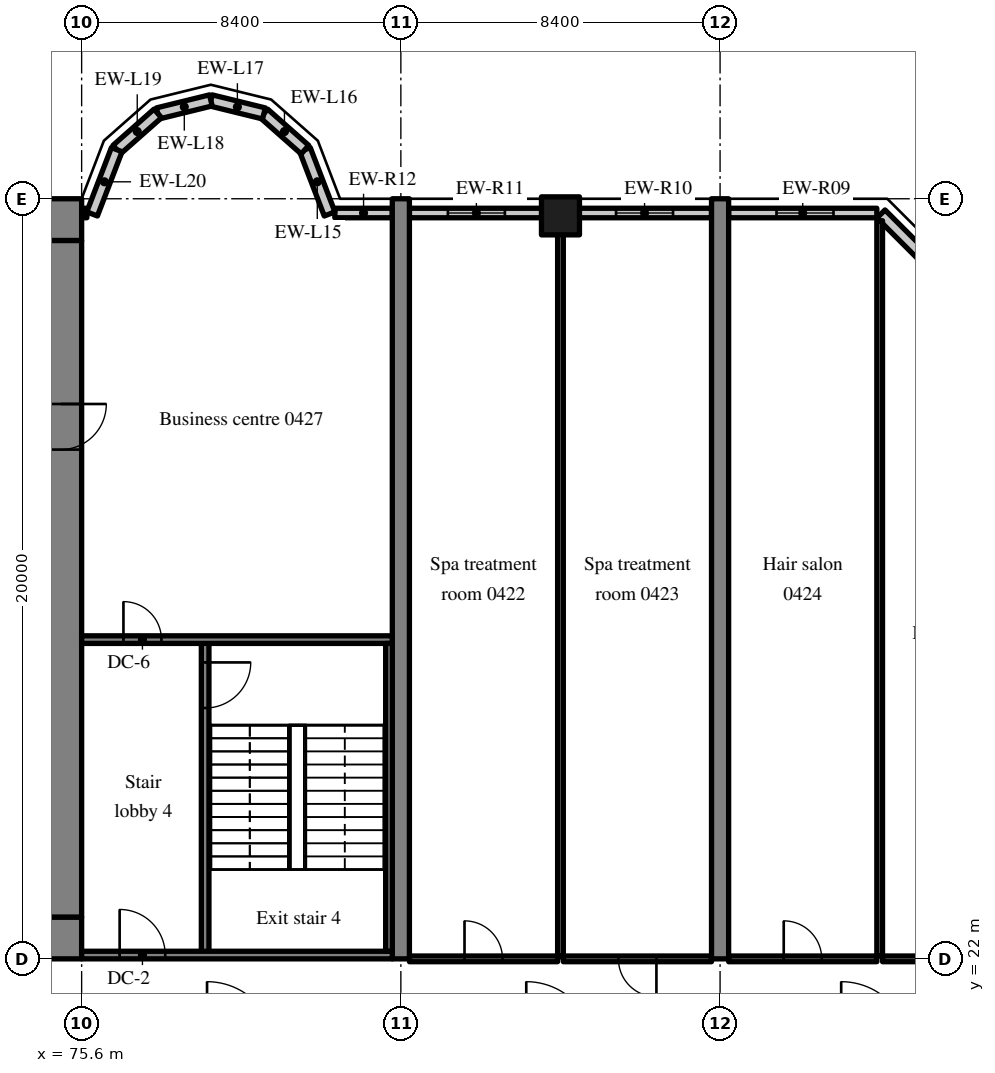
"""IFC4 building model, lengths in metres.
Left out: names, types, materials, properties, quantities, classifications, styles, units other than length and angle.
Written with IfcOpenShell. Run it as: python <this file> out.ifc"""

import sys

from ifc_helpers import new_model, si_unit, direction, frame, frame_2d, origin, origin_2d, place, context, subcontext, project, spatial, rectangle, extrude, source, transform, mapped, element, fill, save


model = new_model("IFC4")
c1 = context("Model", 3, precision=1e-05, world=origin(), true_north=direction((0.0, 1.0)))
c2 = subcontext(c1, "Body", "Model", "MODEL_VIEW")
j1 = project(units=[si_unit("LENGTHUNIT", "METRE"), si_unit("PLANEANGLEUNIT", "RADIAN")], contexts=[c1])
p1 = place(None, origin())
s1 = spatial("IfcSite", under=j1, at=p1, CompositionType="ELEMENT")
p2 = place(p1, origin())
s2 = spatial("IfcBuilding", under=s1, at=p2, CompositionType="ELEMENT")
p3 = place(p2, frame((0.0, 0.0, 23.0)))
s3 = spatial("IfcBuildingStorey", under=s2, at=p3, CompositionType="ELEMENT", Elevation=23.0)
m1 = source(origin(), c2, "Body", "SweptSolid", [
    extrude(rectangle(XDim=50.4, YDim=1.1, at=frame_2d((25.2, 0.0))), origin(), (0.0, 0.0, 1.0), 4.52),
])
p4 = place(p3, frame((25.2, 22.55, 0.0), z_axis=(0.0, 0.0, 1.0), x_axis=(1.0, 0.0, 0.0)))
e1 = element("IfcWall", 1, at=p4, inside=s3, PredefinedType="SHEAR", context=c2, shape_type="MappedRepresentation", body=[
    mapped(m1, transform((0.0, 0.0, 0.0), scale=1.0)),
])
m2 = source(origin(), c2, "Body", "SweptSolid", [
    extrude(rectangle(XDim=1.8, YDim=2.1, at=frame_2d((0.9, 1.05))), frame((0.0, 0.56, 0.0), z_axis=(0.0, -1.0, 0.0), x_axis=(1.0, 0.0, 0.0)), (0.0, 0.0, 1.0), 1.12),
])
p5 = place(p4, frame((15.9, 0.0, 0.0)))
e2 = element("IfcOpeningElement", 2, at=p5, cuts=e1, PredefinedType="OPENING", context=c2, shape_type="MappedRepresentation", body=[
    mapped(m2, transform((0.0, 0.0, 0.0), scale=1.0)),
])
m3 = source(origin(), c2, "Body", "SweptSolid", [
    extrude(rectangle(XDim=1.2, YDim=2.1, at=frame_2d((0.6, 1.05))), frame((0.0, 0.56, 0.0), z_axis=(0.0, -1.0, 0.0), x_axis=(1.0, 0.0, 0.0)), (0.0, 0.0, 1.0), 1.12),
])
p6 = place(p4, frame((27.0, 0.0, 0.0)))
e3 = element("IfcOpeningElement", 3, at=p6, cuts=e1, PredefinedType="OPENING", context=c2, shape_type="MappedRepresentation", body=[
    mapped(m3, transform((0.0, 0.0, 0.0), scale=1.0)),
])
m4 = source(origin(), c2, "Body", "SweptSolid", [
    extrude(rectangle(XDim=0.9, YDim=2.1, at=frame_2d((0.45, 1.05))), frame((0.0, 0.56, 0.0), z_axis=(0.0, -1.0, 0.0), x_axis=(1.0, 0.0, 0.0)), (0.0, 0.0, 1.0), 1.12),
])
p7 = place(p4, frame((32.25, 0.0, 0.0)))
e4 = element("IfcOpeningElement", 4, at=p7, cuts=e1, PredefinedType="OPENING", context=c2, shape_type="MappedRepresentation", body=[
    mapped(m4, transform((0.0, 0.0, 0.0), scale=1.0)),
])
p8 = place(p4, frame((38.25, 0.0, 0.0)))
e5 = element("IfcOpeningElement", 5, at=p8, cuts=e1, PredefinedType="OPENING", context=c2, shape_type="MappedRepresentation", body=[
    mapped(m4, transform((0.0, 0.0, 0.0), scale=1.0)),
])
p9 = place(p4, frame((6.425, 0.0, 0.0)))
e6 = element("IfcOpeningElement", 6, at=p9, cuts=e1, PredefinedType="OPENING", context=c2, shape_type="MappedRepresentation", body=[
    mapped(m3, transform((0.0, 0.0, 0.0), scale=1.0)),
])
p10 = place(p4, frame((47.675, 0.0, 0.0)))
e7 = element("IfcOpeningElement", 7, at=p10, cuts=e1, PredefinedType="OPENING", context=c2, shape_type="MappedRepresentation", body=[
    mapped(m3, transform((0.0, 0.0, 0.0), scale=1.0)),
])
p11 = place(p3, frame((25.2, 41.45, 0.0), z_axis=(0.0, 0.0, 1.0), x_axis=(1.0, 0.0, 0.0)))
e8 = element("IfcWall", 8, at=p11, inside=s3, PredefinedType="SHEAR", context=c2, shape_type="MappedRepresentation", body=[
    mapped(m1, transform((0.0, 0.0, 0.0), scale=1.0)),
])
m5 = source(origin(), c2, "Body", "SweptSolid", [
    extrude(rectangle(XDim=17.8, YDim=1.1, at=frame_2d((8.9, 0.0))), origin(), (0.0, 0.0, 1.0), 4.52),
])
p12 = place(p3, frame((75.05, 23.1, 0.0), z_axis=(0.0, 0.0, 1.0), x_axis=(0.0, 1.0, 0.0)))
e9 = element("IfcWall", 9, at=p12, inside=s3, PredefinedType="SHEAR", context=c2, shape_type="MappedRepresentation", body=[
    mapped(m5, transform((0.0, 0.0, 0.0), scale=1.0)),
])
p13 = place(p12, frame((12.3, 0.0, 0.0)))
e10 = element("IfcOpeningElement", 10, at=p13, cuts=e9, PredefinedType="OPENING", context=c2, shape_type="MappedRepresentation", body=[
    mapped(m3, transform((0.0, 0.0, 0.0), scale=1.0)),
])
m6 = source(origin(), c2, "Body", "SweptSolid", [
    extrude(rectangle(XDim=20.0, YDim=0.45, at=frame_2d((10.0, 0.0))), origin(), (0.0, 0.0, 1.0), 4.52),
])
for number, where, z_axis, x_axis in (
    (11, (84.0, 22.0, 0.0), (0.0, 0.0, 1.0), (0.0, 1.0, 0.0)),
    (12, (92.4, 22.0, 0.0), (0.0, 0.0, 1.0), (0.0, 1.0, 0.0)),
):
    element("IfcWall", number, at=place(p3, frame(where, z_axis=z_axis, x_axis=x_axis)), inside=s3, PredefinedType="SHEAR", context=c2, shape_type="MappedRepresentation", body=[
        mapped(m6, transform((0.0, 0.0, 0.0), scale=1.0)),
    ])
m7 = source(origin(), c2, "Body", "SweptSolid", [
    extrude(rectangle(XDim=1.0, YDim=1.0, at=origin_2d()), origin(), (0.0, 0.0, 1.0), 4.52),
])
p14 = place(p3, frame((88.2, 41.55, 0.0), z_axis=(0.0, 0.0, 1.0), x_axis=(1.0, 0.0, 0.0)))
e13 = element("IfcColumn", 13, at=p14, inside=s3, PredefinedType="COLUMN", context=c2, shape_type="MappedRepresentation", body=[
    mapped(m7, transform((0.0, 0.0, 0.0), scale=1.0)),
])
m8 = source(origin(), c2, "Body", "SweptSolid", [
    extrude(rectangle(XDim=5.173, YDim=0.3, at=frame_2d((2.586, 0.0))), origin(), (0.0, 0.0, 1.0), 3.77),
])
p15 = place(p3, frame((100.292, 37.942, 0.0), z_axis=(0.0, 0.0, 1.0), x_axis=(-0.707106781187, 0.707106781187, 0.0)))
e14 = element("IfcWall", 14, at=p15, inside=s3, PredefinedType="SOLIDWALL", context=c2, shape_type="MappedRepresentation", body=[
    mapped(m8, transform((0.0, 0.0, 0.0), scale=1.0)),
])
m9 = source(origin(), c2, "Body", "SweptSolid", [
    extrude(rectangle(XDim=1.5, YDim=1.5, at=frame_2d((0.75, 0.75))), frame((0.0, 0.16, 0.0), z_axis=(0.0, -1.0, 0.0), x_axis=(1.0, 0.0, 0.0)), (0.0, 0.0, 1.0), 0.32),
])
p16 = place(p15, frame((1.836, 0.0, 0.9)))
e15 = element("IfcOpeningElement", 15, at=p16, cuts=e14, PredefinedType="OPENING", context=c2, shape_type="MappedRepresentation", body=[
    mapped(m9, transform((0.0, 0.0, 0.0), scale=1.0)),
])
m10 = source(origin(), c2, "Body", "SweptSolid", [
    extrude(rectangle(XDim=3.9, YDim=0.25, at=frame_2d((1.95, 0.0))), origin(), (0.0, 0.0, 1.0), 3.77),
])
p17 = place(p3, frame((96.525, 41.625, 0.0), z_axis=(0.0, 0.0, 1.0), x_axis=(-1.0, 0.0, 0.0)))
e16 = element("IfcWall", 16, at=p17, inside=s3, PredefinedType="SOLIDWALL", context=c2, shape_type="MappedRepresentation", body=[
    mapped(m10, transform((0.0, 0.0, 0.0), scale=1.0)),
])
m11 = source(origin(), c2, "Body", "SweptSolid", [
    extrude(rectangle(XDim=1.5, YDim=1.5, at=frame_2d((0.75, 0.75))), frame((0.0, 0.135, 0.0), z_axis=(0.0, -1.0, 0.0), x_axis=(1.0, 0.0, 0.0)), (0.0, 0.0, 1.0), 0.27),
])
p18 = place(p17, frame((1.14, 0.0, 0.9)))
e17 = element("IfcOpeningElement", 17, at=p18, cuts=e16, PredefinedType="OPENING", context=c2, shape_type="MappedRepresentation", body=[
    mapped(m11, transform((0.0, 0.0, 0.0), scale=1.0)),
])
m12 = source(origin(), c2, "Body", "SweptSolid", [
    extrude(rectangle(XDim=3.525, YDim=0.25, at=frame_2d((1.763, 0.0))), origin(), (0.0, 0.0, 1.0), 3.77),
])
p19 = place(p3, frame((92.175, 41.625, 0.0), z_axis=(0.0, 0.0, 1.0), x_axis=(-1.0, 0.0, 0.0)))
e18 = element("IfcWall", 18, at=p19, inside=s3, PredefinedType="SOLIDWALL", context=c2, shape_type="MappedRepresentation", body=[
    mapped(m12, transform((0.0, 0.0, 0.0), scale=1.0)),
])
p20 = place(p19, frame((1.012, 0.0, 0.9)))
e19 = element("IfcOpeningElement", 19, at=p20, cuts=e18, PredefinedType="OPENING", context=c2, shape_type="MappedRepresentation", body=[
    mapped(m11, transform((0.0, 0.0, 0.0), scale=1.0)),
])
m13 = source(origin(), c2, "Body", "SweptSolid", [
    extrude(rectangle(XDim=3.525, YDim=0.25, at=frame_2d((1.762, 0.0))), origin(), (0.0, 0.0, 1.0), 3.77),
])
p21 = place(p3, frame((87.75, 41.625, 0.0), z_axis=(0.0, 0.0, 1.0), x_axis=(-1.0, 0.0, 0.0)))
e20 = element("IfcWall", 20, at=p21, inside=s3, PredefinedType="SOLIDWALL", context=c2, shape_type="MappedRepresentation", body=[
    mapped(m13, transform((0.0, 0.0, 0.0), scale=1.0)),
])
p22 = place(p21, frame((1.012, 0.0, 0.9)))
e21 = element("IfcOpeningElement", 21, at=p22, cuts=e20, PredefinedType="OPENING", context=c2, shape_type="MappedRepresentation", body=[
    mapped(m11, transform((0.0, 0.0, 0.0), scale=1.0)),
])
m14 = source(origin(), c2, "Body", "SweptSolid", [
    extrude(rectangle(XDim=1.513, YDim=0.25, at=frame_2d((0.756, 0.0))), origin(), (0.0, 0.0, 1.0), 3.77),
])
p23 = place(p3, frame((83.775, 41.625, 0.0), z_axis=(0.0, 0.0, 1.0), x_axis=(-1.0, 0.0, 0.0)))
e22 = element("IfcWall", 22, at=p23, inside=s3, PredefinedType="SOLIDWALL", context=c2, shape_type="MappedRepresentation", body=[
    mapped(m14, transform((0.0, 0.0, 0.0), scale=1.0)),
])
m15 = source(origin(), c2, "Body", "SweptSolid", [
    extrude(rectangle(XDim=1.812, YDim=0.3, at=frame_2d((0.906, 0.0))), origin(), (0.0, 0.0, 1.0), 4.52),
])
p24 = place(p3, frame((82.125, 41.6, 0.0), z_axis=(0.0, 0.0, 1.0), x_axis=(-0.357877270961, 0.93376863244, 0.0)))
e23 = element("IfcWall", 23, at=p24, inside=s3, PredefinedType="SOLIDWALL", context=c2, shape_type="MappedRepresentation", body=[
    mapped(m15, transform((0.0, 0.0, 0.0), scale=1.0)),
])
m16 = source(origin(), c2, "Body", "SweptSolid", [
    extrude(rectangle(XDim=1.44, YDim=0.3, at=frame_2d((0.72, 0.0))), origin(), (0.0, 0.0, 1.0), 4.52),
])
p25 = place(p3, frame((81.477, 43.292, 0.0), z_axis=(0.0, 0.0, 1.0), x_axis=(-0.74957555648, 0.661918790432, 0.0)))
e24 = element("IfcWall", 24, at=p25, inside=s3, PredefinedType="SOLIDWALL", context=c2, shape_type="MappedRepresentation", body=[
    mapped(m16, transform((0.0, 0.0, 0.0), scale=1.0)),
])
m17 = source(origin(), c2, "Body", "SweptSolid", [
    extrude(rectangle(XDim=1.439, YDim=0.3, at=frame_2d((0.719, 0.0))), origin(), (0.0, 0.0, 1.0), 4.52),
])
for number, where, z_axis, x_axis in (
    (25, (80.397, 44.245, 0.0), (0.0, 0.0, 1.0), (-0.971, 0.238, 0.0)),
    (26, (79.0, 44.588, 0.0), (0.0, 0.0, 1.0), (-0.971, -0.238, 0.0)),
):
    element("IfcWall", number, at=place(p3, frame(where, z_axis=z_axis, x_axis=x_axis)), inside=s3, PredefinedType="SOLIDWALL", context=c2, shape_type="MappedRepresentation", body=[
        mapped(m17, transform((0.0, 0.0, 0.0), scale=1.0)),
    ])
p26 = place(p3, frame((77.603, 44.245, 0.0), z_axis=(0.0, 0.0, 1.0), x_axis=(-0.74957555648, -0.661918790432, 0.0)))
e27 = element("IfcWall", 27, at=p26, inside=s3, PredefinedType="SOLIDWALL", context=c2, shape_type="MappedRepresentation", body=[
    mapped(m16, transform((0.0, 0.0, 0.0), scale=1.0)),
])
p27 = place(p3, frame((76.523, 43.292, 0.0), z_axis=(0.0, 0.0, 1.0), x_axis=(-0.357877270961, -0.93376863244, 0.0)))
e28 = element("IfcWall", 28, at=p27, inside=s3, PredefinedType="SOLIDWALL", context=c2, shape_type="MappedRepresentation", body=[
    mapped(m15, transform((0.0, 0.0, 0.0), scale=1.0)),
])
m18 = source(origin(), c2, "Body", "SweptSolid", [
    extrude(rectangle(XDim=0.138, YDim=0.25, at=frame_2d((0.069, 0.0))), origin(), (0.0, 0.0, 1.0), 3.77),
])
p28 = place(p3, frame((75.738, 41.625, 0.0), z_axis=(0.0, 0.0, 1.0), x_axis=(-1.0, 0.0, 0.0)))
e29 = element("IfcWall", 29, at=p28, inside=s3, PredefinedType="SOLIDWALL", context=c2, shape_type="MappedRepresentation", body=[
    mapped(m18, transform((0.0, 0.0, 0.0), scale=1.0)),
])
m19 = source(origin(), c2, "Body", "SweptSolid", [
    extrude(rectangle(XDim=8.3, YDim=0.2, at=frame_2d((4.15, 0.0))), origin(), (0.0, 0.0, 1.0), 4.52),
])
p29 = place(p3, frame((78.85, 22.1, 0.0), z_axis=(0.0, 0.0, 1.0), x_axis=(0.0, 1.0, 0.0)))
e30 = element("IfcWall", 30, at=p29, inside=s3, PredefinedType="SOLIDWALL", context=c2, shape_type="MappedRepresentation", body=[
    mapped(m19, transform((0.0, 0.0, 0.0), scale=1.0)),
])
m20 = source(origin(), c2, "Body", "SweptSolid", [
    extrude(rectangle(XDim=1.2, YDim=2.1, at=frame_2d((0.6, 1.05))), frame((0.0, 0.11, 0.0), z_axis=(0.0, -1.0, 0.0), x_axis=(1.0, 0.0, 0.0)), (0.0, 0.0, 1.0), 0.22),
])
p30 = place(p29, frame((6.5, 0.0, 0.0)))
e31 = element("IfcOpeningElement", 31, at=p30, cuts=e30, PredefinedType="OPENING", context=c2, shape_type="MappedRepresentation", body=[
    mapped(m20, transform((0.0, 0.0, 0.0), scale=1.0)),
])
m21 = source(origin(), c2, "Body", "SweptSolid", [
    extrude(rectangle(XDim=8.175, YDim=0.2, at=frame_2d((4.087, 0.0))), origin(), (0.0, 0.0, 1.0), 4.52),
])
p31 = place(p3, frame((83.775, 22.1, 0.0), z_axis=(0.0, 0.0, 1.0), x_axis=(-1.0, 0.0, 0.0)))
e32 = element("IfcWall", 32, at=p31, inside=s3, PredefinedType="SOLIDWALL", context=c2, shape_type="MappedRepresentation", body=[
    mapped(m21, transform((0.0, 0.0, 0.0), scale=1.0)),
])
p32 = place(p31, frame((5.975, 0.0, 0.0)))
e33 = element("IfcOpeningElement", 33, at=p32, cuts=e32, PredefinedType="OPENING", context=c2, shape_type="MappedRepresentation", body=[
    mapped(m20, transform((0.0, 0.0, 0.0), scale=1.0)),
])
p33 = place(p3, frame((83.775, 30.4, 0.0), z_axis=(0.0, 0.0, 1.0), x_axis=(-1.0, 0.0, 0.0)))
e34 = element("IfcWall", 34, at=p33, inside=s3, PredefinedType="SOLIDWALL", context=c2, shape_type="MappedRepresentation", body=[
    mapped(m21, transform((0.0, 0.0, 0.0), scale=1.0)),
])
m22 = source(origin(), c2, "Body", "SweptSolid", [
    extrude(rectangle(XDim=1.0, YDim=2.1, at=frame_2d((0.5, 1.05))), frame((0.0, 0.11, 0.0), z_axis=(0.0, -1.0, 0.0), x_axis=(1.0, 0.0, 0.0)), (0.0, 0.0, 1.0), 0.22),
])
p34 = place(p33, frame((6.075, 0.0, 0.0)))
e35 = element("IfcOpeningElement", 35, at=p34, cuts=e34, PredefinedType="OPENING", context=c2, shape_type="MappedRepresentation", body=[
    mapped(m22, transform((0.0, 0.0, 0.0), scale=1.0)),
])
m23 = source(origin(), c2, "Body", "SweptSolid", [
    extrude(rectangle(XDim=8.1, YDim=0.175, at=frame_2d((4.05, 0.0))), origin(), (0.0, 0.0, 1.0), 4.52),
])
p35 = place(p3, frame((83.688, 22.2, 0.0), z_axis=(0.0, 0.0, 1.0), x_axis=(0.0, 1.0, 0.0)))
e36 = element("IfcWall", 36, at=p35, inside=s3, PredefinedType="SOLIDWALL", context=c2, shape_type="MappedRepresentation", body=[
    mapped(m23, transform((0.0, 0.0, 0.0), scale=1.0)),
])
m24 = source(origin(), c2, "Body", "SweptSolid", [
    extrude(rectangle(XDim=3.9, YDim=0.15, at=frame_2d((1.95, 0.0))), origin(), (0.0, 0.0, 1.0), 3.82),
])
p36 = place(p3, frame((84.225, 22.0, 0.0), z_axis=(0.0, 0.0, 1.0), x_axis=(1.0, 0.0, 0.0)))
e37 = element("IfcWall", 37, at=p36, inside=s3, PredefinedType="PARTITIONING", context=c2, shape_type="MappedRepresentation", body=[
    mapped(m24, transform((0.0, 0.0, 0.0), scale=1.0)),
])
m25 = source(origin(), c2, "Body", "SweptSolid", [
    extrude(rectangle(XDim=1.0, YDim=2.1, at=frame_2d((0.5, 1.05))), frame((0.0, 0.085, 0.0), z_axis=(0.0, -1.0, 0.0), x_axis=(1.0, 0.0, 0.0)), (0.0, 0.0, 1.0), 0.17),
])
p37 = place(p36, frame((1.45, 0.0, 0.0)))
e38 = element("IfcOpeningElement", 38, at=p37, cuts=e37, PredefinedType="OPENING", context=c2, shape_type="MappedRepresentation", body=[
    mapped(m25, transform((0.0, 0.0, 0.0), scale=1.0)),
])
m26 = source(origin(), c2, "Body", "SweptSolid", [
    extrude(rectangle(XDim=3.9, YDim=0.15, at=frame_2d((1.95, 0.0))), origin(), (0.0, 0.0, 1.0), 3.82),
])
p38 = place(p3, frame((88.275, 22.0, 0.0), z_axis=(0.0, 0.0, 1.0), x_axis=(1.0, 0.0, 0.0)))
e39 = element("IfcWall", 39, at=p38, inside=s3, PredefinedType="PARTITIONING", context=c2, shape_type="MappedRepresentation", body=[
    mapped(m26, transform((0.0, 0.0, 0.0), scale=1.0)),
])
p39 = place(p38, frame((1.45, 0.0, 0.0)))
e40 = element("IfcOpeningElement", 40, at=p39, cuts=e39, PredefinedType="OPENING", context=c2, shape_type="MappedRepresentation", body=[
    mapped(m25, transform((0.0, 0.0, 0.0), scale=1.0)),
])
m27 = source(origin(), c2, "Body", "SweptSolid", [
    extrude(rectangle(XDim=19.025, YDim=0.15, at=frame_2d((9.513, 0.0))), origin(), (0.0, 0.0, 1.0), 4.52),
])
p40 = place(p3, frame((88.2, 22.075, 0.0), z_axis=(0.0, 0.0, 1.0), x_axis=(0.0, 1.0, 0.0)))
e41 = element("IfcWall", 41, at=p40, inside=s3, PredefinedType="PARTITIONING", context=c2, shape_type="MappedRepresentation", body=[
    mapped(m27, transform((0.0, 0.0, 0.0), scale=1.0)),
])
p41 = place(p3, frame((92.625, 22.0, 0.0), z_axis=(0.0, 0.0, 1.0), x_axis=(1.0, 0.0, 0.0)))
e42 = element("IfcWall", 42, at=p41, inside=s3, PredefinedType="PARTITIONING", context=c2, shape_type="MappedRepresentation", body=[
    mapped(m24, transform((0.0, 0.0, 0.0), scale=1.0)),
])
p42 = place(p41, frame((1.45, 0.0, 0.0)))
e43 = element("IfcOpeningElement", 43, at=p42, cuts=e42, PredefinedType="OPENING", context=c2, shape_type="MappedRepresentation", body=[
    mapped(m25, transform((0.0, 0.0, 0.0), scale=1.0)),
])
m28 = source(origin(), c2, "Body", "SweptSolid", [
    extrude(rectangle(XDim=3.625, YDim=0.15, at=frame_2d((1.812, 0.0))), origin(), (0.0, 0.0, 1.0), 3.82),
])
p43 = place(p3, frame((96.675, 22.0, 0.0), z_axis=(0.0, 0.0, 1.0), x_axis=(1.0, 0.0, 0.0)))
e44 = element("IfcWall", 44, at=p43, inside=s3, PredefinedType="PARTITIONING", context=c2, shape_type="MappedRepresentation", body=[
    mapped(m28, transform((0.0, 0.0, 0.0), scale=1.0)),
])
p44 = place(p43, frame((1.337, 0.0, 0.0)))
e45 = element("IfcOpeningElement", 45, at=p44, cuts=e44, PredefinedType="OPENING", context=c2, shape_type="MappedRepresentation", body=[
    mapped(m25, transform((0.0, 0.0, 0.0), scale=1.0)),
])
m29 = source(origin(), c2, "Body", "SweptSolid", [
    extrude(rectangle(XDim=19.347, YDim=0.15, at=frame_2d((9.674, 0.0))), origin(), (0.0, 0.0, 1.0), 4.52),
])
p45 = place(p3, frame((96.6, 22.075, 0.0), z_axis=(0.0, 0.0, 1.0), x_axis=(0.0, 1.0, 0.0)))
e46 = element("IfcWall", 46, at=p45, inside=s3, PredefinedType="PARTITIONING", context=c2, shape_type="MappedRepresentation", body=[
    mapped(m29, transform((0.0, 0.0, 0.0), scale=1.0)),
])
m30 = source(origin(), c2, "Body", "SweptSolid", [
    extrude(rectangle(XDim=1.5, YDim=1.5, at=frame_2d((0.75, 0.75))), frame((0.0, 0.03, 0.0), z_axis=(0.0, -1.0, 0.0), x_axis=(1.0, 0.0, 0.0)), (0.0, 0.0, 1.0), 0.06),
])
p46 = place(p18, origin())
e47 = element("IfcWindow", 47, at=p46, inside=s3, PartitioningType="SINGLE_PANEL", PredefinedType="WINDOW", context=c2, shape_type="MappedRepresentation", body=[
    mapped(m30, transform((0.0, 0.0, 0.0), scale=1.0)),
])
fill(e17, e47)
p47 = place(p20, origin())
e48 = element("IfcWindow", 48, at=p47, inside=s3, PartitioningType="SINGLE_PANEL", PredefinedType="WINDOW", context=c2, shape_type="MappedRepresentation", body=[
    mapped(m30, transform((0.0, 0.0, 0.0), scale=1.0)),
])
fill(e19, e48)
p48 = place(p22, origin())
e49 = element("IfcWindow", 49, at=p48, inside=s3, PartitioningType="SINGLE_PANEL", PredefinedType="WINDOW", context=c2, shape_type="MappedRepresentation", body=[
    mapped(m30, transform((0.0, 0.0, 0.0), scale=1.0)),
])
fill(e21, e49)
m31 = source(origin(), c2, "Body", "SweptSolid", [
    extrude(rectangle(XDim=1.2, YDim=2.1, at=frame_2d((0.6, 1.05))), frame((0.0, 0.025, 0.0), z_axis=(0.0, -1.0, 0.0), x_axis=(1.0, 0.0, 0.0)), (0.0, 0.0, 1.0), 0.05),
])
p49 = place(p13, origin())
e50 = element("IfcDoor", 50, at=p49, inside=s3, OperationType="SINGLE_SWING_RIGHT", PredefinedType="DOOR", context=c2, shape_type="MappedRepresentation", body=[
    mapped(m31, transform((0.0, 0.0, 0.0), scale=1.0)),
])
fill(e10, e50)
p50 = place(p30, origin())
e51 = element("IfcDoor", 51, at=p50, inside=s3, OperationType="SINGLE_SWING_RIGHT", PredefinedType="DOOR", context=c2, shape_type="MappedRepresentation", body=[
    mapped(m31, transform((0.0, 0.0, 0.0), scale=1.0)),
])
fill(e31, e51)
p51 = place(p32, origin())
e52 = element("IfcDoor", 52, at=p51, inside=s3, OperationType="SINGLE_SWING_RIGHT", PredefinedType="DOOR", context=c2, shape_type="MappedRepresentation", body=[
    mapped(m31, transform((0.0, 0.0, 0.0), scale=1.0)),
])
fill(e33, e52)
m32 = source(origin(), c2, "Body", "SweptSolid", [
    extrude(rectangle(XDim=1.0, YDim=2.1, at=frame_2d((0.5, 1.05))), frame((0.0, 0.025, 0.0), z_axis=(0.0, -1.0, 0.0), x_axis=(1.0, 0.0, 0.0)), (0.0, 0.0, 1.0), 0.05),
])
p52 = place(p34, origin())
e53 = element("IfcDoor", 53, at=p52, inside=s3, OperationType="SINGLE_SWING_RIGHT", PredefinedType="DOOR", context=c2, shape_type="MappedRepresentation", body=[
    mapped(m32, transform((0.0, 0.0, 0.0), scale=1.0)),
])
fill(e35, e53)
p53 = place(p37, origin())
e54 = element("IfcDoor", 54, at=p53, inside=s3, OperationType="SINGLE_SWING_LEFT", PredefinedType="DOOR", context=c2, shape_type="MappedRepresentation", body=[
    mapped(m32, transform((0.0, 0.0, 0.0), scale=1.0)),
])
fill(e38, e54)
p54 = place(p39, origin())
e55 = element("IfcDoor", 55, at=p54, inside=s3, OperationType="SINGLE_SWING_RIGHT", PredefinedType="DOOR", context=c2, shape_type="MappedRepresentation", body=[
    mapped(m32, transform((0.0, 0.0, 0.0), scale=1.0)),
])
fill(e40, e55)
p55 = place(p42, origin())
e56 = element("IfcDoor", 56, at=p55, inside=s3, OperationType="SINGLE_SWING_LEFT", PredefinedType="DOOR", context=c2, shape_type="MappedRepresentation", body=[
    mapped(m32, transform((0.0, 0.0, 0.0), scale=1.0)),
])
fill(e43, e56)
save(model, sys.argv[1])
